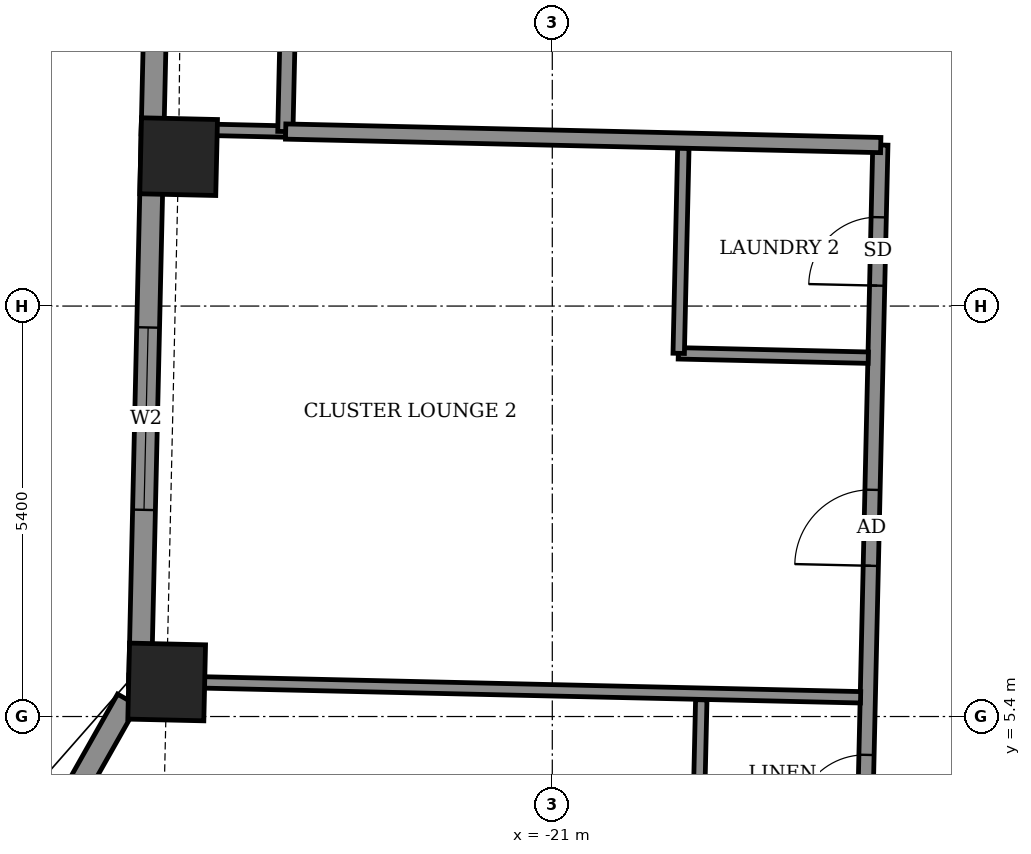
"""IFC4 building model, lengths in metres.
Left out: names, types, materials, properties, quantities, classifications, styles, units other than length and angle.
Written with IfcOpenShell. Run it as: python <this file> out.ifc"""

import sys

from ifc_helpers import new_model, si_unit, direction, frame, frame_2d, origin, origin_2d, place, context, subcontext, project, spatial, rectangle, extrude, element, fill, save


model = new_model("IFC4")
c1 = context("Model", 3, precision=1e-05, world=origin(), true_north=direction((0.0, 1.0)))
c2 = subcontext(c1, "Body", "Model", "MODEL_VIEW")
j1 = project(units=[si_unit("LENGTHUNIT", "METRE"), si_unit("PLANEANGLEUNIT", "RADIAN")], contexts=[c1])
p1 = place(None, origin())
s1 = spatial("IfcSite", under=j1, at=p1, CompositionType="ELEMENT")
p2 = place(p1, origin())
s2 = spatial("IfcBuilding", under=s1, at=p2, CompositionType="ELEMENT")
p3 = place(p2, frame((0.0, 0.0, 271.7)))
s3 = spatial("IfcBuildingStorey", under=s2, at=p3, CompositionType="ELEMENT", Elevation=271.7)
for number, where, z_axis, x_axis in (
    (1, (-25.916, 12.766, -0.55), (0.0, 0.0, 1.0), (-0.023, -1.0, 0.0)),
    (2, (-26.073, 5.855, -0.55), (0.0, 0.0, 1.0), (-0.023, -1.0, 0.0)),
):
    element("IfcColumn", number, at=place(p3, frame(where, z_axis=z_axis, x_axis=x_axis)), inside=s3, PredefinedType="COLUMN", context=c2, shape_type="SweptSolid", body=[
        extrude(rectangle(XDim=1.0, YDim=1.0, at=origin_2d()), origin(), (0.0, 0.0, 1.0), 3.6),
    ])
p4 = place(p3, frame((-26.108, 19.732, 0.0), z_axis=(0.0, 0.0, 1.0), x_axis=(-0.022700699365, -0.999742305921, 0.0)))
e3 = element("IfcWall", 3, at=p4, inside=s3, PredefinedType="SOLIDWALL", context=c2, shape_type="SweptSolid", body=[
    extrude(rectangle(XDim=13.927, YDim=0.3, at=frame_2d((6.964, 0.0))), origin(), (0.0, 0.0, 1.0), 2.55),
])
p5 = place(p4, frame((2.933, 0.0, 0.0)))
e4 = element("IfcOpeningElement", 4, at=p5, cuts=e3, PredefinedType="OPENING", context=c2, shape_type="SweptSolid", body=[
    extrude(rectangle(XDim=1.5, YDim=2.4, at=frame_2d((0.75, 1.2))), frame((0.0, 0.16, 0.0), z_axis=(0.0, -1.0, 0.0), x_axis=(1.0, 0.0, 0.0)), (0.0, 0.0, 1.0), 0.32),
])
p6 = place(p4, frame((9.216, 0.0, 0.9)))
e5 = element("IfcOpeningElement", 5, at=p6, cuts=e3, PredefinedType="OPENING", context=c2, shape_type="SweptSolid", body=[
    extrude(rectangle(XDim=2.4, YDim=1.5, at=frame_2d((1.2, 0.75))), frame((0.0, 0.16, 0.0), z_axis=(0.0, -1.0, 0.0), x_axis=(1.0, 0.0, 0.0)), (0.0, 0.0, 1.0), 0.32),
])
p7 = place(p3, frame((-26.589, 5.621, 0.0), z_axis=(0.0, 0.0, 1.0), x_axis=(-0.492495436053, -0.870315026566, 0.0)))
e6 = element("IfcWall", 6, at=p7, inside=s3, PredefinedType="SOLIDWALL", context=c2, shape_type="SweptSolid", body=[
    extrude(rectangle(XDim=5.397, YDim=0.3, at=frame_2d((2.698, 0.0))), origin(), (0.0, 0.0, 1.0), 3.05),
])
p8 = place(p7, frame((2.007, 0.0, 0.9)))
e7 = element("IfcOpeningElement", 7, at=p8, cuts=e6, PredefinedType="OPENING", context=c2, shape_type="SweptSolid", body=[
    extrude(rectangle(XDim=1.2, YDim=1.5, at=frame_2d((0.6, 0.75))), frame((0.0, 0.16, 0.0), z_axis=(0.0, -1.0, 0.0), x_axis=(1.0, 0.0, 0.0)), (0.0, 0.0, 1.0), 0.32),
])
p9 = place(p3, frame((-17.262, -12.525, 0.0), z_axis=(0.0, 0.0, 1.0), x_axis=(0.022706151961, 0.999742182097, 0.0)))
e8 = element("IfcWall", 8, at=p9, inside=s3, PredefinedType="PARTITIONING", context=c2, shape_type="SweptSolid", body=[
    extrude(rectangle(XDim=25.45, YDim=0.2, at=frame_2d((12.725, 0.0))), origin(), (0.0, 0.0, 1.0), 3.05),
])
p10 = place(p9, frame((19.913, 0.0, 0.0)))
e9 = element("IfcOpeningElement", 9, at=p10, cuts=e8, PredefinedType="OPENING", context=c2, shape_type="SweptSolid", body=[
    extrude(rectangle(XDim=1.0, YDim=2.1, at=frame_2d((0.5, 1.05))), frame((0.0, 0.11, 0.0), z_axis=(0.0, -1.0, 0.0), x_axis=(1.0, 0.0, 0.0)), (0.0, 0.0, 1.0), 0.22),
])
p11 = place(p9, frame((23.6, 0.0, 0.0)))
e10 = element("IfcOpeningElement", 10, at=p11, cuts=e8, PredefinedType="OPENING", context=c2, shape_type="SweptSolid", body=[
    extrude(rectangle(XDim=0.9, YDim=2.1, at=frame_2d((0.45, 1.05))), frame((0.0, 0.11, 0.0), z_axis=(0.0, -1.0, 0.0), x_axis=(1.0, 0.0, 0.0)), (0.0, 0.0, 1.0), 0.22),
])
p12 = place(p9, frame((14.325, 0.0, 0.0)))
e11 = element("IfcOpeningElement", 11, at=p12, cuts=e8, PredefinedType="OPENING", context=c2, shape_type="SweptSolid", body=[
    extrude(rectangle(XDim=1.0, YDim=2.1, at=frame_2d((0.5, 1.05))), frame((0.0, 0.11, 0.0), z_axis=(0.0, -1.0, 0.0), x_axis=(1.0, 0.0, 0.0)), (0.0, 0.0, 1.0), 0.22),
])
p13 = place(p9, frame((16.525, 0.0, 0.0)))
e12 = element("IfcOpeningElement", 12, at=p13, cuts=e8, PredefinedType="OPENING", context=c2, shape_type="SweptSolid", body=[
    extrude(rectangle(XDim=0.9, YDim=2.1, at=frame_2d((0.45, 1.05))), frame((0.0, 0.11, 0.0), z_axis=(0.0, -1.0, 0.0), x_axis=(1.0, 0.0, 0.0)), (0.0, 0.0, 1.0), 0.22),
])
p14 = place(p9, frame((9.85, 0.0, 0.0)))
e13 = element("IfcOpeningElement", 13, at=p14, cuts=e8, PredefinedType="OPENING", context=c2, shape_type="SweptSolid", body=[
    extrude(rectangle(XDim=1.0, YDim=2.1, at=frame_2d((0.5, 1.05))), frame((0.0, 0.11, 0.0), z_axis=(0.0, -1.0, 0.0), x_axis=(1.0, 0.0, 0.0)), (0.0, 0.0, 1.0), 0.22),
])
p15 = place(p9, frame((12.125, 0.0, 0.0)))
e14 = element("IfcOpeningElement", 14, at=p15, cuts=e8, PredefinedType="OPENING", context=c2, shape_type="SweptSolid", body=[
    extrude(rectangle(XDim=0.9, YDim=2.1, at=frame_2d((0.45, 1.05))), frame((0.0, 0.11, 0.0), z_axis=(0.0, -1.0, 0.0), x_axis=(1.0, 0.0, 0.0)), (0.0, 0.0, 1.0), 0.22),
])
p16 = place(p9, frame((7.725, 0.0, 0.0)))
e15 = element("IfcOpeningElement", 15, at=p16, cuts=e8, PredefinedType="OPENING", context=c2, shape_type="SweptSolid", body=[
    extrude(rectangle(XDim=1.0, YDim=2.1, at=frame_2d((0.5, 1.05))), frame((0.0, 0.11, 0.0), z_axis=(0.0, -1.0, 0.0), x_axis=(1.0, 0.0, 0.0)), (0.0, 0.0, 1.0), 0.22),
])
p17 = place(p9, frame((5.275, 0.0, 0.0)))
e16 = element("IfcOpeningElement", 16, at=p17, cuts=e8, PredefinedType="OPENING", context=c2, shape_type="SweptSolid", body=[
    extrude(rectangle(XDim=0.9, YDim=2.1, at=frame_2d((0.45, 1.05))), frame((0.0, 0.11, 0.0), z_axis=(0.0, -1.0, 0.0), x_axis=(1.0, 0.0, 0.0)), (0.0, 0.0, 1.0), 0.22),
])
p18 = place(p9, frame((0.512, 0.0, 0.0)))
e17 = element("IfcOpeningElement", 17, at=p18, cuts=e8, PredefinedType="OPENING", context=c2, shape_type="SweptSolid", body=[
    extrude(rectangle(XDim=1.0, YDim=2.1, at=frame_2d((0.5, 1.05))), frame((0.0, 0.11, 0.0), z_axis=(0.0, -1.0, 0.0), x_axis=(1.0, 0.0, 0.0)), (0.0, 0.0, 1.0), 0.22),
])
p19 = place(p9, frame((2.775, 0.0, 0.0)))
e18 = element("IfcOpeningElement", 18, at=p19, cuts=e8, PredefinedType="OPENING", context=c2, shape_type="SweptSolid", body=[
    extrude(rectangle(XDim=0.9, YDim=2.1, at=frame_2d((0.45, 1.05))), frame((0.0, 0.11, 0.0), z_axis=(0.0, -1.0, 0.0), x_axis=(1.0, 0.0, 0.0)), (0.0, 0.0, 1.0), 0.22),
])
p20 = place(p3, frame((-19.093, 3.296, 0.0), z_axis=(0.0, 0.0, 1.0), x_axis=(0.022788198363, 0.99974031529, 0.0)))
e19 = element("IfcWall", 19, at=p20, inside=s3, PredefinedType="PARTITIONING", context=c2, shape_type="SweptSolid", body=[
    extrude(rectangle(XDim=2.325, YDim=0.15, at=frame_2d((1.162, 0.0))), origin(), (0.0, 0.0, 1.0), 3.05),
])
p21 = place(p3, frame((-26.573, 5.871, 0.0), z_axis=(0.0, 0.0, 1.0), x_axis=(0.999743768709, -0.022636186244, 0.0)))
e20 = element("IfcWall", 20, at=p21, inside=s3, PredefinedType="PARTITIONING", context=c2, shape_type="SweptSolid", body=[
    extrude(rectangle(XDim=9.631, YDim=0.15, at=frame_2d((4.816, 0.0))), origin(), (0.0, 0.0, 1.0), 3.05),
])
p22 = place(p3, frame((-19.342, 10.178, 0.0), z_axis=(0.0, 0.0, 1.0), x_axis=(0.999741028149, -0.022756903044, 0.0)))
e21 = element("IfcWall", 21, at=p22, inside=s3, PredefinedType="PARTITIONING", context=c2, shape_type="SweptSolid", body=[
    extrude(rectangle(XDim=2.5, YDim=0.15, at=frame_2d((1.25, 0.0))), origin(), (0.0, 0.0, 1.0), 3.05),
])
p23 = place(p3, frame((-19.337, 10.178, 0.0), z_axis=(0.0, 0.0, 1.0), x_axis=(0.02260842146, 0.999744396973, 0.0)))
e22 = element("IfcWall", 22, at=p23, inside=s3, PredefinedType="PARTITIONING", context=c2, shape_type="SweptSolid", body=[
    extrude(rectangle(XDim=2.7, YDim=0.15, at=frame_2d((1.35, 0.0))), origin(), (0.0, 0.0, 1.0), 3.05),
])
p24 = place(p3, frame((-26.408, 13.139, 0.0), z_axis=(0.0, 0.0, 1.0), x_axis=(0.999745462568, -0.022561251624, 0.0)))
e23 = element("IfcWall", 23, at=p24, inside=s3, PredefinedType="PARTITIONING", context=c2, shape_type="SweptSolid", body=[
    extrude(rectangle(XDim=1.905, YDim=0.15, at=frame_2d((0.952, 0.0))), origin(), (0.0, 0.0, 1.0), 3.05),
])
p25 = place(p3, frame((-24.512, 13.096, 0.0), z_axis=(0.0, 0.0, 1.0), x_axis=(0.022617910375, 0.999744182344, 0.0)))
e24 = element("IfcWall", 24, at=p25, inside=s3, PredefinedType="PARTITIONING", context=c2, shape_type="SweptSolid", body=[
    extrude(rectangle(XDim=1.5, YDim=0.2, at=frame_2d((0.75, 0.0))), origin(), (0.0, 0.0, 1.0), 3.05),
])
p26 = place(p3, frame((-24.508, 13.096, 0.0), z_axis=(0.0, 0.0, 1.0), x_axis=(0.99974170677, -0.022727070732, 0.0)))
e25 = element("IfcWall", 25, at=p26, inside=s3, PredefinedType="PARTITIONING", context=c2, shape_type="SweptSolid", body=[
    extrude(rectangle(XDim=7.831, YDim=0.2, at=frame_2d((3.916, 0.0))), origin(), (0.0, 0.0, 1.0), 3.05),
])
p27 = place(p3, frame((-24.474, 14.596, 0.0), z_axis=(0.0, 0.0, 1.0), x_axis=(0.999742424031, -0.022695497208, 0.0)))
e26 = element("IfcWall", 26, at=p27, inside=s3, PredefinedType="PARTITIONING", context=c2, shape_type="SweptSolid", body=[
    extrude(rectangle(XDim=52.872, YDim=0.2, at=frame_2d((26.436, 0.0))), origin(), (0.0, 0.0, 1.0), 3.05),
])
p28 = place(p27, frame((51.161, 0.0, 0.0)))
e27 = element("IfcOpeningElement", 27, at=p28, cuts=e26, PredefinedType="OPENING", context=c2, shape_type="SweptSolid", body=[
    extrude(rectangle(XDim=1.0, YDim=2.1, at=frame_2d((0.5, 1.05))), frame((0.0, 0.11, 0.0), z_axis=(0.0, -1.0, 0.0), x_axis=(1.0, 0.0, 0.0)), (0.0, 0.0, 1.0), 0.22),
])
p29 = place(p27, frame((46.7, 0.0, 0.0)))
e28 = element("IfcOpeningElement", 28, at=p29, cuts=e26, PredefinedType="OPENING", context=c2, shape_type="SweptSolid", body=[
    extrude(rectangle(XDim=0.9, YDim=2.1, at=frame_2d((0.45, 1.05))), frame((0.0, 0.11, 0.0), z_axis=(0.0, -1.0, 0.0), x_axis=(1.0, 0.0, 0.0)), (0.0, 0.0, 1.0), 0.22),
])
p30 = place(p27, frame((44.3, 0.0, 0.0)))
e29 = element("IfcOpeningElement", 29, at=p30, cuts=e26, PredefinedType="OPENING", context=c2, shape_type="SweptSolid", body=[
    extrude(rectangle(XDim=0.9, YDim=2.1, at=frame_2d((0.45, 1.05))), frame((0.0, 0.11, 0.0), z_axis=(0.0, -1.0, 0.0), x_axis=(1.0, 0.0, 0.0)), (0.0, 0.0, 1.0), 0.22),
])
p31 = place(p27, frame((37.575, 0.0, 0.0)))
e30 = element("IfcOpeningElement", 30, at=p31, cuts=e26, PredefinedType="OPENING", context=c2, shape_type="SweptSolid", body=[
    extrude(rectangle(XDim=0.9, YDim=2.1, at=frame_2d((0.45, 1.05))), frame((0.0, 0.11, 0.0), z_axis=(0.0, -1.0, 0.0), x_axis=(1.0, 0.0, 0.0)), (0.0, 0.0, 1.0), 0.22),
])
p32 = place(p27, frame((35.675, 0.0, 0.0)))
e31 = element("IfcOpeningElement", 31, at=p32, cuts=e26, PredefinedType="OPENING", context=c2, shape_type="SweptSolid", body=[
    extrude(rectangle(XDim=0.9, YDim=2.1, at=frame_2d((0.45, 1.05))), frame((0.0, 0.11, 0.0), z_axis=(0.0, -1.0, 0.0), x_axis=(1.0, 0.0, 0.0)), (0.0, 0.0, 1.0), 0.22),
])
p33 = place(p27, frame((28.95, 0.0, 0.0)))
e32 = element("IfcOpeningElement", 32, at=p33, cuts=e26, PredefinedType="OPENING", context=c2, shape_type="SweptSolid", body=[
    extrude(rectangle(XDim=0.9, YDim=2.1, at=frame_2d((0.45, 1.05))), frame((0.0, 0.11, 0.0), z_axis=(0.0, -1.0, 0.0), x_axis=(1.0, 0.0, 0.0)), (0.0, 0.0, 1.0), 0.22),
])
p34 = place(p27, frame((27.0, 0.0, 0.0)))
e33 = element("IfcOpeningElement", 33, at=p34, cuts=e26, PredefinedType="OPENING", context=c2, shape_type="SweptSolid", body=[
    extrude(rectangle(XDim=0.9, YDim=2.1, at=frame_2d((0.45, 1.05))), frame((0.0, 0.11, 0.0), z_axis=(0.0, -1.0, 0.0), x_axis=(1.0, 0.0, 0.0)), (0.0, 0.0, 1.0), 0.22),
])
p35 = place(p27, frame((20.2, 0.0, 0.0)))
e34 = element("IfcOpeningElement", 34, at=p35, cuts=e26, PredefinedType="OPENING", context=c2, shape_type="SweptSolid", body=[
    extrude(rectangle(XDim=0.9, YDim=2.1, at=frame_2d((0.45, 1.05))), frame((0.0, 0.11, 0.0), z_axis=(0.0, -1.0, 0.0), x_axis=(1.0, 0.0, 0.0)), (0.0, 0.0, 1.0), 0.22),
])
p36 = place(p27, frame((18.25, 0.0, 0.0)))
e35 = element("IfcOpeningElement", 35, at=p36, cuts=e26, PredefinedType="OPENING", context=c2, shape_type="SweptSolid", body=[
    extrude(rectangle(XDim=0.9, YDim=2.1, at=frame_2d((0.45, 1.05))), frame((0.0, 0.11, 0.0), z_axis=(0.0, -1.0, 0.0), x_axis=(1.0, 0.0, 0.0)), (0.0, 0.0, 1.0), 0.22),
])
p37 = place(p27, frame((11.5, 0.0, 0.0)))
e36 = element("IfcOpeningElement", 36, at=p37, cuts=e26, PredefinedType="OPENING", context=c2, shape_type="SweptSolid", body=[
    extrude(rectangle(XDim=0.9, YDim=2.1, at=frame_2d((0.45, 1.05))), frame((0.0, 0.11, 0.0), z_axis=(0.0, -1.0, 0.0), x_axis=(1.0, 0.0, 0.0)), (0.0, 0.0, 1.0), 0.22),
])
p38 = place(p27, frame((9.475, 0.0, 0.0)))
e37 = element("IfcOpeningElement", 37, at=p38, cuts=e26, PredefinedType="OPENING", context=c2, shape_type="SweptSolid", body=[
    extrude(rectangle(XDim=0.9, YDim=2.1, at=frame_2d((0.45, 1.05))), frame((0.0, 0.11, 0.0), z_axis=(0.0, -1.0, 0.0), x_axis=(1.0, 0.0, 0.0)), (0.0, 0.0, 1.0), 0.22),
])
p39 = place(p27, frame((2.293, 0.0, 0.0)))
e38 = element("IfcOpeningElement", 38, at=p39, cuts=e26, PredefinedType="OPENING", context=c2, shape_type="SweptSolid", body=[
    extrude(rectangle(XDim=1.0, YDim=2.1, at=frame_2d((0.5, 1.05))), frame((0.0, 0.11, 0.0), z_axis=(0.0, -1.0, 0.0), x_axis=(1.0, 0.0, 0.0)), (0.0, 0.0, 1.0), 0.22),
])
p40 = place(p6, origin())
e39 = element("IfcWindow", 39, at=p40, inside=s3, PartitioningType="DOUBLE_PANEL_VERTICAL", PredefinedType="WINDOW", context=c2, shape_type="SweptSolid", body=[
    extrude(rectangle(XDim=2.4, YDim=1.5, at=frame_2d((1.2, 0.75))), frame((0.0, 0.03, 0.0), z_axis=(0.0, -1.0, 0.0), x_axis=(1.0, 0.0, 0.0)), (0.0, 0.0, 1.0), 0.06),
])
fill(e5, e39)
p41 = place(p10, origin())
e40 = element("IfcDoor", 40, at=p41, inside=s3, OperationType="SINGLE_SWING_LEFT", PredefinedType="DOOR", context=c2, shape_type="SweptSolid", body=[
    extrude(rectangle(XDim=1.0, YDim=2.1, at=frame_2d((0.5, 1.05))), frame((0.0, 0.025, 0.0), z_axis=(0.0, -1.0, 0.0), x_axis=(1.0, 0.0, 0.0)), (0.0, 0.0, 1.0), 0.05),
])
fill(e9, e40)
p42 = place(p11, origin())
e41 = element("IfcDoor", 41, at=p42, inside=s3, OperationType="SINGLE_SWING_LEFT", PredefinedType="DOOR", context=c2, shape_type="SweptSolid", body=[
    extrude(rectangle(XDim=0.9, YDim=2.1, at=frame_2d((0.45, 1.05))), frame((0.0, 0.025, 0.0), z_axis=(0.0, -1.0, 0.0), x_axis=(1.0, 0.0, 0.0)), (0.0, 0.0, 1.0), 0.05),
])
fill(e10, e41)
p43 = place(p13, origin())
e42 = element("IfcDoor", 42, at=p43, inside=s3, OperationType="SINGLE_SWING_RIGHT", PredefinedType="DOOR", context=c2, shape_type="SweptSolid", body=[
    extrude(rectangle(XDim=0.9, YDim=2.1, at=frame_2d((0.45, 1.05))), frame((0.0, 0.025, 0.0), z_axis=(0.0, -1.0, 0.0), x_axis=(1.0, 0.0, 0.0)), (0.0, 0.0, 1.0), 0.05),
])
fill(e12, e42)
save(model, sys.argv[1])
